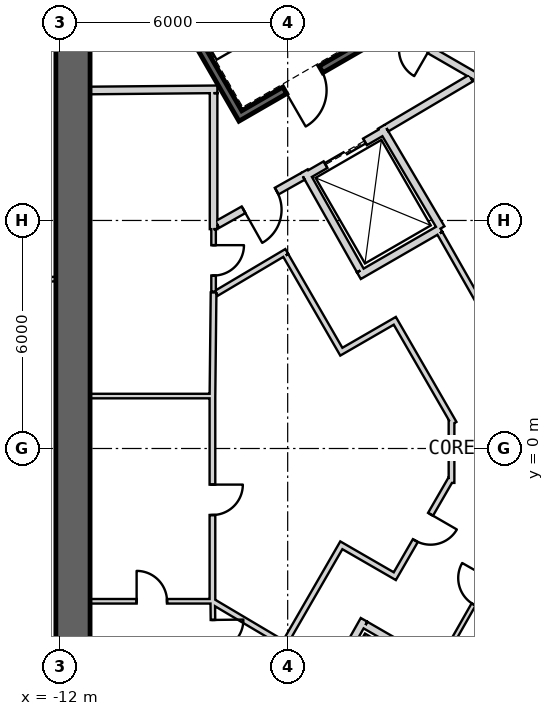
"""IFC4 building model, lengths in metres.
Left out: names, types, materials, properties, quantities, classifications, styles, units other than length and angle.
Written with IfcOpenShell. Run it as: python <this file> out.ifc"""

import sys

from ifc_helpers import new_model, si_unit, direction, frame, frame_2d, origin, place, context, subcontext, project, spatial, rectangle, extrude, element, fill, save


model = new_model("IFC4")
c1 = context("Model", 3, precision=1e-05, world=origin(), true_north=direction((0.0, 1.0)))
c2 = subcontext(c1, "Body", "Model", "MODEL_VIEW")
j1 = project(units=[si_unit("LENGTHUNIT", "METRE"), si_unit("PLANEANGLEUNIT", "RADIAN")], contexts=[c1])
p1 = place(None, origin())
s1 = spatial("IfcSite", under=j1, at=p1, CompositionType="ELEMENT")
p2 = place(p1, origin())
s2 = spatial("IfcBuilding", under=s1, at=p2, CompositionType="ELEMENT")
p3 = place(p2, frame((0.0, 0.0, 415.3)))
s3 = spatial("IfcBuildingStorey", under=s2, at=p3, CompositionType="ELEMENT", Elevation=415.3)
p4 = place(p3, frame((19.475, 2.208, 0.0), z_axis=(0.0, 0.0, 1.0), x_axis=(-0.866028369851, 0.499994862586, 0.0)))
e1 = element("IfcWall", 1, at=p4, inside=s3, PredefinedType="SHEAR", context=c2, shape_type="SweptSolid", body=[
    extrude(rectangle(XDim=31.523, YDim=0.9, at=frame_2d((15.762, 0.0))), origin(), (0.0, 0.0, 1.0), 5.0),
])
p5 = place(p4, frame((3.612, 0.0, 0.0)))
e2 = element("IfcOpeningElement", 2, at=p5, cuts=e1, PredefinedType="OPENING", context=c2, shape_type="SweptSolid", body=[
    extrude(rectangle(XDim=1.2, YDim=2.4, at=frame_2d((0.6, 1.2))), frame((0.0, 0.46, 0.0), z_axis=(0.0, -1.0, 0.0), x_axis=(1.0, 0.0, 0.0)), (0.0, 0.0, 1.0), 0.92),
])
p6 = place(p4, frame((26.712, 0.0, 0.0)))
e3 = element("IfcOpeningElement", 3, at=p6, cuts=e1, PredefinedType="OPENING", context=c2, shape_type="SweptSolid", body=[
    extrude(rectangle(XDim=1.2, YDim=2.4, at=frame_2d((0.6, 1.2))), frame((0.0, 0.46, 0.0), z_axis=(0.0, -1.0, 0.0), x_axis=(1.0, 0.0, 0.0)), (0.0, 0.0, 1.0), 0.92),
])
p7 = place(p3, frame((-11.65, 15.762, 0.0), z_axis=(0.0, 0.0, 1.0), x_axis=(0.0, -1.0, 0.0)))
e4 = element("IfcWall", 4, at=p7, inside=s3, PredefinedType="SHEAR", context=c2, shape_type="SweptSolid", body=[
    extrude(rectangle(XDim=31.523, YDim=0.9, at=frame_2d((15.762, 0.0))), origin(), (0.0, 0.0, 1.0), 5.0),
])
p8 = place(p7, frame((3.612, 0.0, 0.0)))
e5 = element("IfcOpeningElement", 5, at=p8, cuts=e4, PredefinedType="OPENING", context=c2, shape_type="SweptSolid", body=[
    extrude(rectangle(XDim=1.2, YDim=2.4, at=frame_2d((0.6, 1.2))), frame((0.0, 0.46, 0.0), z_axis=(0.0, -1.0, 0.0), x_axis=(1.0, 0.0, 0.0)), (0.0, 0.0, 1.0), 0.92),
])
p9 = place(p7, frame((26.712, 0.0, 0.0)))
e6 = element("IfcOpeningElement", 6, at=p9, cuts=e4, PredefinedType="OPENING", context=c2, shape_type="SweptSolid", body=[
    extrude(rectangle(XDim=1.2, YDim=2.4, at=frame_2d((0.6, 1.2))), frame((0.0, 0.46, 0.0), z_axis=(0.0, -1.0, 0.0), x_axis=(1.0, 0.0, 0.0)), (0.0, 0.0, 1.0), 0.92),
])
p10 = place(p3, frame((-7.825, -17.97, 0.0), z_axis=(0.0, 0.0, 1.0), x_axis=(0.866028369851, 0.499994862586, 0.0)))
e7 = element("IfcWall", 7, at=p10, inside=s3, PredefinedType="SHEAR", context=c2, shape_type="SweptSolid", body=[
    extrude(rectangle(XDim=31.523, YDim=0.9, at=frame_2d((15.762, 0.0))), origin(), (0.0, 0.0, 1.0), 5.0),
])
p11 = place(p10, frame((17.862, 0.0, 0.0)))
e8 = element("IfcOpeningElement", 8, at=p11, cuts=e7, PredefinedType="OPENING", context=c2, shape_type="SweptSolid", body=[
    extrude(rectangle(XDim=1.2, YDim=2.4, at=frame_2d((0.6, 1.2))), frame((0.0, 0.46, 0.0), z_axis=(0.0, -1.0, 0.0), x_axis=(1.0, 0.0, 0.0)), (0.0, 0.0, 1.0), 0.92),
])
p12 = place(p10, frame((20.562, 0.0, 0.0)))
e9 = element("IfcOpeningElement", 9, at=p12, cuts=e7, PredefinedType="OPENING", context=c2, shape_type="SweptSolid", body=[
    extrude(rectangle(XDim=1.2, YDim=2.4, at=frame_2d((0.6, 1.2))), frame((0.0, 0.46, 0.0), z_axis=(0.0, -1.0, 0.0), x_axis=(1.0, 0.0, 0.0)), (0.0, 0.0, 1.0), 0.92),
])
p13 = place(p10, frame((26.712, 0.0, 0.0)))
e10 = element("IfcOpeningElement", 10, at=p13, cuts=e7, PredefinedType="OPENING", context=c2, shape_type="SweptSolid", body=[
    extrude(rectangle(XDim=1.2, YDim=2.4, at=frame_2d((0.6, 1.2))), frame((0.0, 0.46, 0.0), z_axis=(0.0, -1.0, 0.0), x_axis=(1.0, 0.0, 0.0)), (0.0, 0.0, 1.0), 0.92),
])
p14 = place(p10, frame((3.612, 0.0, 0.0)))
e11 = element("IfcOpeningElement", 11, at=p14, cuts=e7, PredefinedType="OPENING", context=c2, shape_type="SweptSolid", body=[
    extrude(rectangle(XDim=1.2, YDim=2.4, at=frame_2d((0.6, 1.2))), frame((0.0, 0.46, 0.0), z_axis=(0.0, -1.0, 0.0), x_axis=(1.0, 0.0, 0.0)), (0.0, 0.0, 1.0), 0.92),
])
p15 = place(p3, frame((-2.146, 21.113, 0.04), z_axis=(0.0, 0.0, 1.0), x_axis=(0.902316759071, -0.43107362051, 0.0)))
e12 = element("IfcWall", 12, at=p15, inside=s3, PredefinedType="PARAPET", context=c2, shape_type="SweptSolid", body=[
    extrude(rectangle(XDim=24.864, YDim=0.5, at=frame_2d((12.432, 0.0))), origin(), (0.0, 0.0, 1.0), 0.6),
])
p16 = place(p3, frame((-11.245, 15.678, -0.25), z_axis=(0.0, 0.0, 1.0), x_axis=(0.499977274689, -0.866038523851, 0.0)))
e13 = element("IfcWall", 13, at=p16, inside=s3, PredefinedType="SHEAR", context=c2, shape_type="SweptSolid", body=[
    extrude(rectangle(XDim=8.1, YDim=0.2, at=frame_2d((4.05, 0.0))), origin(), (0.0, 0.0, 1.0), 5.0),
])
p17 = place(p3, frame((-7.159, 8.8, -0.25), z_axis=(0.0, 0.0, 1.0), x_axis=(0.866047807691, 0.499961193289, 0.0)))
e14 = element("IfcWall", 14, at=p17, inside=s3, PredefinedType="SHEAR", context=c2, shape_type="SweptSolid", body=[
    extrude(rectangle(XDim=3.6, YDim=0.2, at=frame_2d((1.8, 0.0))), origin(), (0.0, 0.0, 1.0), 5.0),
])
p18 = place(p17, frame((1.25, 0.0, 0.25)))
e15 = element("IfcOpeningElement", 15, at=p18, cuts=e14, PredefinedType="OPENING", context=c2, shape_type="SweptSolid", body=[
    extrude(rectangle(XDim=1.1, YDim=2.1, at=frame_2d((0.55, 1.05))), frame((0.0, 0.11, 0.0), z_axis=(0.0, -1.0, 0.0), x_axis=(1.0, 0.0, 0.0)), (0.0, 0.0, 1.0), 0.22),
])
p19 = place(p3, frame((-5.524, 7.168, 0.0), z_axis=(0.0, 0.0, 1.0), x_axis=(0.866024647952, 0.500001309137, 0.0)))
e16 = element("IfcWall", 16, at=p19, inside=s3, PredefinedType="PLUMBINGWALL", context=c2, shape_type="SweptSolid", body=[
    extrude(rectangle(XDim=2.4, YDim=0.2, at=frame_2d((1.2, 0.0))), origin(), (0.0, 0.0, 1.0), 4.75),
])
p20 = place(p19, frame((0.6, 0.0, 0.0)))
e17 = element("IfcOpeningElement", 17, at=p20, cuts=e16, PredefinedType="OPENING", context=c2, shape_type="SweptSolid", body=[
    extrude(rectangle(XDim=1.2, YDim=2.4, at=frame_2d((0.6, 1.2))), frame((0.0, 0.11, 0.0), z_axis=(0.0, -1.0, 0.0), x_axis=(1.0, 0.0, 0.0)), (0.0, 0.0, 1.0), 0.22),
])
p21 = place(p3, frame((-3.538, 8.465, 0.0), z_axis=(0.0, 0.0, 1.0), x_axis=(0.508647062354, -0.860975125052, 0.0)))
e18 = element("IfcWall", 18, at=p21, inside=s3, PredefinedType="PLUMBINGWALL", context=c2, shape_type="SweptSolid", body=[
    extrude(rectangle(XDim=3.1, YDim=0.2, at=frame_2d((1.55, 0.0))), origin(), (0.0, 0.0, 1.0), 4.75),
])
p22 = place(p3, frame((-1.979, 5.786, 0.0), z_axis=(0.0, 0.0, 1.0), x_axis=(-0.866016689309, -0.500015093611, 0.0)))
e19 = element("IfcWall", 19, at=p22, inside=s3, PredefinedType="PLUMBINGWALL", context=c2, shape_type="SweptSolid", body=[
    extrude(rectangle(XDim=2.479, YDim=0.2, at=frame_2d((1.24, 0.0))), origin(), (0.0, 0.0, 1.0), 4.75),
])
p23 = place(p3, frame((-5.562, 7.296, 0.0), z_axis=(0.0, 0.0, 1.0), x_axis=(0.49134651263, -0.870964180966, 0.0)))
e20 = element("IfcWall", 20, at=p23, inside=s3, PredefinedType="PLUMBINGWALL", context=c2, shape_type="SweptSolid", body=[
    extrude(rectangle(XDim=3.0, YDim=0.2, at=frame_2d((1.5, 0.0))), origin(), (0.0, 0.0, 1.0), 4.75),
])
p24 = place(p3, frame((-3.99, -4.509, 0.0), z_axis=(0.0, 0.0, 1.0), x_axis=(-0.491358283181, -0.870957540612, 0.0)))
e21 = element("IfcWall", 21, at=p24, inside=s3, PredefinedType="PLUMBINGWALL", context=c2, shape_type="SweptSolid", body=[
    extrude(rectangle(XDim=3.2, YDim=0.2, at=frame_2d((1.6, 0.0))), origin(), (0.0, 0.0, 1.0), 4.75),
])
p25 = place(p3, frame((-3.953, -4.646, 0.0), z_axis=(0.0, 0.0, 1.0), x_axis=(0.866065302921, -0.4999308863, 0.0)))
e22 = element("IfcWall", 22, at=p25, inside=s3, PredefinedType="PLUMBINGWALL", context=c2, shape_type="SweptSolid", body=[
    extrude(rectangle(XDim=2.264, YDim=0.2, at=frame_2d((1.132, 0.0))), origin(), (0.0, 0.0, 1.0), 4.75),
])
p26 = place(p3, frame((-11.2, 1.38, 0.0), z_axis=(0.0, 0.0, 1.0), x_axis=(1.0, 0.0, 0.0)))
e23 = element("IfcWall", 23, at=p26, inside=s3, PredefinedType="PARTITIONING", context=c2, shape_type="SweptSolid", body=[
    extrude(rectangle(XDim=3.25, YDim=0.12, at=frame_2d((1.625, 0.0))), origin(), (0.0, 0.0, 1.0), 4.75),
])
p27 = place(p3, frame((-7.85, 9.451, 0.0), z_axis=(0.0, 0.0, 1.0), x_axis=(-0.999957167047, -0.009255488683, 0.0)))
e24 = element("IfcWall", 24, at=p27, inside=s3, PredefinedType="PARTITIONING", context=c2, shape_type="SweptSolid", body=[
    extrude(rectangle(XDim=3.35, YDim=0.2, at=frame_2d((1.675, 0.0))), origin(), (0.0, 0.0, 1.0), 4.75),
])
p28 = place(p3, frame((-7.95, 5.772, 0.0), z_axis=(0.0, 0.0, 1.0), x_axis=(0.0, 1.0, 0.0)))
e25 = element("IfcWall", 25, at=p28, inside=s3, PredefinedType="PARTITIONING", context=c2, shape_type="SweptSolid", body=[
    extrude(rectangle(XDim=3.578, YDim=0.2, at=frame_2d((1.789, 0.0))), origin(), (0.0, 0.0, 1.0), 4.75),
])
p29 = place(p3, frame((-7.95, 4.105, 0.0), z_axis=(0.0, 0.0, 1.0), x_axis=(-0.010899742406, -0.999940596043, 0.0)))
e26 = element("IfcWall", 26, at=p29, inside=s3, PredefinedType="PLUMBINGWALL", context=c2, shape_type="SweptSolid", body=[
    extrude(rectangle(XDim=2.755, YDim=0.15, at=frame_2d((1.377, 0.0))), origin(), (0.0, 0.0, 1.0), 4.75),
])
p30 = place(p3, frame((-7.95, 4.128, 0.0), z_axis=(0.0, 0.0, 1.0), x_axis=(0.0, 1.0, 0.0)))
e27 = element("IfcWall", 27, at=p30, inside=s3, PredefinedType="PARTITIONING", context=c2, shape_type="SweptSolid", body=[
    extrude(rectangle(XDim=1.644, YDim=0.12, at=frame_2d((0.822, 0.0))), origin(), (0.0, 0.0, 1.0), 4.75),
])
p31 = place(p30, frame((0.422, 0.0, 0.0)))
e28 = element("IfcOpeningElement", 28, at=p31, cuts=e27, PredefinedType="OPENING", context=c2, shape_type="SweptSolid", body=[
    extrude(rectangle(XDim=0.8, YDim=2.1, at=frame_2d((0.4, 1.05))), frame((0.0, 0.07, 0.0), z_axis=(0.0, -1.0, 0.0), x_axis=(1.0, 0.0, 0.0)), (0.0, 0.0, 1.0), 0.14),
])
p32 = place(p3, frame((-11.2, -4.02, 0.0), z_axis=(0.0, 0.0, 1.0), x_axis=(1.0, 0.0, 0.0)))
e29 = element("IfcWall", 29, at=p32, inside=s3, PredefinedType="PARTITIONING", context=c2, shape_type="SweptSolid", body=[
    extrude(rectangle(XDim=3.25, YDim=0.12, at=frame_2d((1.625, 0.0))), origin(), (0.0, 0.0, 1.0), 4.75),
])
p33 = place(p32, frame((1.225, 0.0, 0.0)))
e30 = element("IfcOpeningElement", 30, at=p33, cuts=e29, PredefinedType="OPENING", context=c2, shape_type="SweptSolid", body=[
    extrude(rectangle(XDim=0.8, YDim=2.1, at=frame_2d((0.4, 1.05))), frame((0.0, 0.07, 0.0), z_axis=(0.0, -1.0, 0.0), x_axis=(1.0, 0.0, 0.0)), (0.0, 0.0, 1.0), 0.14),
])
p34 = place(p3, frame((-7.98, 1.35, 0.0), z_axis=(0.0, 0.0, 1.0), x_axis=(0.0, -1.0, 0.0)))
e31 = element("IfcWall", 31, at=p34, inside=s3, PredefinedType="PLUMBINGWALL", context=c2, shape_type="SweptSolid", body=[
    extrude(rectangle(XDim=5.4, YDim=0.15, at=frame_2d((2.7, 0.0))), origin(), (0.0, 0.0, 1.0), 4.75),
])
p35 = place(p34, frame((2.3, 0.0, 0.0)))
e32 = element("IfcOpeningElement", 32, at=p35, cuts=e31, PredefinedType="OPENING", context=c2, shape_type="SweptSolid", body=[
    extrude(rectangle(XDim=0.8, YDim=2.1, at=frame_2d((0.4, 1.05))), frame((0.0, 0.085, 0.0), z_axis=(0.0, -1.0, 0.0), x_axis=(1.0, 0.0, 0.0)), (0.0, 0.0, 1.0), 0.17),
])
p36 = place(p3, frame((-7.951, -5.772, 0.0), z_axis=(0.0, 0.0, 1.0), x_axis=(-0.012047318415, 0.999927428426, 0.0)))
e33 = element("IfcWall", 33, at=p36, inside=s3, PredefinedType="PARTITIONING", context=c2, shape_type="SweptSolid", body=[
    extrude(rectangle(XDim=1.723, YDim=0.12, at=frame_2d((0.861, 0.0))), origin(), (0.0, 0.0, 1.0), 4.75),
])
p37 = place(p36, frame((0.461, 0.0, 0.0)))
e34 = element("IfcOpeningElement", 34, at=p37, cuts=e33, PredefinedType="OPENING", context=c2, shape_type="SweptSolid", body=[
    extrude(rectangle(XDim=0.8, YDim=2.1, at=frame_2d((0.4, 1.05))), frame((0.0, 0.07, 0.0), z_axis=(0.0, -1.0, 0.0), x_axis=(1.0, 0.0, 0.0)), (0.0, 0.0, 1.0), 0.14),
])
p38 = place(p3, frame((-4.296, 11.66, 0.0), z_axis=(0.0, 0.0, 1.0), x_axis=(0.866027389382, -0.499996560828, 0.0)))
e35 = element("IfcWall", 35, at=p38, inside=s3, PredefinedType="PARTITIONING", context=c2, shape_type="SweptSolid", body=[
    extrude(rectangle(XDim=3.778, YDim=0.2, at=frame_2d((1.889, 0.0))), origin(), (0.0, 0.0, 1.0), 4.75),
])
p39 = place(p38, frame((1.539, 0.0, 0.0)))
e36 = element("IfcOpeningElement", 36, at=p39, cuts=e35, PredefinedType="OPENING", context=c2, shape_type="SweptSolid", body=[
    extrude(rectangle(XDim=0.8, YDim=2.1, at=frame_2d((0.4, 1.05))), frame((0.0, 0.11, 0.0), z_axis=(0.0, -1.0, 0.0), x_axis=(1.0, 0.0, 0.0)), (0.0, 0.0, 1.0), 0.22),
])
p40 = place(p3, frame((-1.179, 9.745, 0.0), z_axis=(0.0, 0.0, 1.0), x_axis=(-0.860630814782, -0.509229418482, 0.0)))
e37 = element("IfcWall", 37, at=p40, inside=s3, PredefinedType="PARTITIONING", context=c2, shape_type="SweptSolid", body=[
    extrude(rectangle(XDim=2.582, YDim=0.2, at=frame_2d((1.291, 0.0))), origin(), (0.0, 0.0, 1.0), 4.75),
])
p41 = place(p3, frame((-5.6, 7.16, 0.0), z_axis=(0.0, 0.0, 1.0), x_axis=(-0.871350695252, -0.490660744185, 0.0)))
e38 = element("IfcWall", 38, at=p41, inside=s3, PredefinedType="PARTITIONING", context=c2, shape_type="SweptSolid", body=[
    extrude(rectangle(XDim=2.582, YDim=0.2, at=frame_2d((1.291, 0.0))), origin(), (0.0, 0.0, 1.0), 4.75),
])
p42 = place(p41, frame((0.791, 0.0, 0.0)))
e39 = element("IfcOpeningElement", 39, at=p42, cuts=e38, PredefinedType="OPENING", context=c2, shape_type="SweptSolid", body=[
    extrude(rectangle(XDim=1.0, YDim=2.1, at=frame_2d((0.5, 1.05))), frame((0.0, 0.11, 0.0), z_axis=(0.0, -1.0, 0.0), x_axis=(1.0, 0.0, 0.0)), (0.0, 0.0, 1.0), 0.22),
])
p43 = place(p3, frame((-1.994, 5.661, 0.0), z_axis=(0.0, 0.0, 1.0), x_axis=(0.494341211302, -0.869267948798, 0.0)))
e40 = element("IfcWall", 40, at=p43, inside=s3, PredefinedType="PLUMBINGWALL", context=c2, shape_type="SweptSolid", body=[
    extrude(rectangle(XDim=4.361, YDim=0.15, at=frame_2d((2.18, 0.0))), origin(), (0.0, 0.0, 1.0), 4.75),
])
p44 = place(p3, frame((0.224, -1.761, 0.0), z_axis=(0.0, 0.0, 1.0), x_axis=(-0.494327216836, -0.869275907118, 0.0)))
e41 = element("IfcWall", 41, at=p44, inside=s3, PredefinedType="PARTITIONING", context=c2, shape_type="SweptSolid", body=[
    extrude(rectangle(XDim=4.487, YDim=0.12, at=frame_2d((2.244, 0.0))), origin(), (0.0, 0.0, 1.0), 4.75),
])
p45 = place(p44, frame((1.895, 0.0, 0.0)))
e42 = element("IfcOpeningElement", 42, at=p45, cuts=e41, PredefinedType="OPENING", context=c2, shape_type="SweptSolid", body=[
    extrude(rectangle(XDim=0.8, YDim=2.1, at=frame_2d((0.4, 1.05))), frame((0.0, 0.07, 0.0), z_axis=(0.0, -1.0, 0.0), x_axis=(1.0, 0.0, 0.0)), (0.0, 0.0, 1.0), 0.14),
])
p46 = place(p3, frame((-6.024, 5.183, 0.0), z_axis=(0.0, 0.0, 1.0), x_axis=(-0.860114558627, -0.510100917503, 0.0)))
e43 = element("IfcWall", 43, at=p46, inside=s3, PredefinedType="PLUMBINGWALL", context=c2, shape_type="SweptSolid", body=[
    extrude(rectangle(XDim=2.152, YDim=0.15, at=frame_2d((1.076, 0.0))), origin(), (0.0, 0.0, 1.0), 4.75),
])
p47 = place(p3, frame((-4.551, 2.482, 0.0), z_axis=(0.0, 0.0, 1.0), x_axis=(-0.499990139034, 0.866031096941, 0.0)))
e44 = element("IfcWall", 44, at=p47, inside=s3, PredefinedType="PLUMBINGWALL", context=c2, shape_type="SweptSolid", body=[
    extrude(rectangle(XDim=3.0, YDim=0.15, at=frame_2d((1.5, 0.0))), origin(), (0.0, 0.0, 1.0), 4.75),
])
p48 = place(p3, frame((-3.116, 3.397, 0.0), z_axis=(0.0, 0.0, 1.0), x_axis=(-0.866053003207, -0.499952193351, 0.0)))
e45 = element("IfcWall", 45, at=p48, inside=s3, PredefinedType="PLUMBINGWALL", context=c2, shape_type="SweptSolid", body=[
    extrude(rectangle(XDim=1.625, YDim=0.15, at=frame_2d((0.812, 0.0))), origin(), (0.0, 0.0, 1.0), 4.75),
])
p49 = place(p3, frame((-1.624, 0.663, 0.0), z_axis=(0.0, 0.0, 1.0), x_axis=(-0.500035348339, 0.866004994449, 0.0)))
e46 = element("IfcWall", 46, at=p49, inside=s3, PredefinedType="PLUMBINGWALL", context=c2, shape_type="SweptSolid", body=[
    extrude(rectangle(XDim=3.039, YDim=0.15, at=frame_2d((1.52, 0.0))), origin(), (0.0, 0.0, 1.0), 4.75),
])
p50 = place(p3, frame((-1.689, -0.905, 0.0), z_axis=(0.0, 0.0, 1.0), x_axis=(0.0, 1.0, 0.0)))
e47 = element("IfcWall", 47, at=p50, inside=s3, PredefinedType="PLUMBINGWALL", context=c2, shape_type="SweptSolid", body=[
    extrude(rectangle(XDim=1.656, YDim=0.15, at=frame_2d((0.828, 0.0))), origin(), (0.0, 0.0, 1.0), 4.75),
])
p51 = place(p3, frame((-3.219, -3.425, 0.0), z_axis=(0.0, 0.0, 1.0), x_axis=(0.499996236806, 0.866027576455, 0.0)))
e48 = element("IfcWall", 48, at=p51, inside=s3, PredefinedType="PLUMBINGWALL", context=c2, shape_type="SweptSolid", body=[
    extrude(rectangle(XDim=3.036, YDim=0.15, at=frame_2d((1.518, 0.0))), origin(), (0.0, 0.0, 1.0), 4.75),
])
p52 = place(p51, frame((1.156, 0.0, 0.0)))
e49 = element("IfcOpeningElement", 49, at=p52, cuts=e48, PredefinedType="OPENING", context=c2, shape_type="SweptSolid", body=[
    extrude(rectangle(XDim=0.8, YDim=2.1, at=frame_2d((0.4, 1.05))), frame((0.0, 0.085, 0.0), z_axis=(0.0, -1.0, 0.0), x_axis=(1.0, 0.0, 0.0)), (0.0, 0.0, 1.0), 0.17),
])
p53 = place(p3, frame((-4.653, -2.51, 0.0), z_axis=(0.0, 0.0, 1.0), x_axis=(0.866053003207, -0.499952193351, 0.0)))
e50 = element("IfcWall", 50, at=p53, inside=s3, PredefinedType="PLUMBINGWALL", context=c2, shape_type="SweptSolid", body=[
    extrude(rectangle(XDim=1.625, YDim=0.15, at=frame_2d((0.812, 0.0))), origin(), (0.0, 0.0, 1.0), 4.75),
])
p54 = place(p3, frame((-6.126, -5.21, 0.0), z_axis=(0.0, 0.0, 1.0), x_axis=(0.499990139034, 0.866031096941, 0.0)))
e51 = element("IfcWall", 51, at=p54, inside=s3, PredefinedType="PLUMBINGWALL", context=c2, shape_type="SweptSolid", body=[
    extrude(rectangle(XDim=3.0, YDim=0.15, at=frame_2d((1.5, 0.0))), origin(), (0.0, 0.0, 1.0), 4.75),
])
p55 = place(p3, frame((-7.95, -4.041, 0.0), z_axis=(0.0, 0.0, 1.0), x_axis=(0.860090281069, -0.510141851263, 0.0)))
e52 = element("IfcWall", 52, at=p55, inside=s3, PredefinedType="PLUMBINGWALL", context=c2, shape_type="SweptSolid", body=[
    extrude(rectangle(XDim=2.089, YDim=0.15, at=frame_2d((1.045, 0.0))), origin(), (0.0, 0.0, 1.0), 4.75),
])
p56 = place(p3, frame((-12.1, 4.462, 0.0), z_axis=(0.0, 0.0, 1.0), x_axis=(-0.996967215132, -0.077822695606, 0.0)))
e53 = element("IfcWall", 53, at=p56, inside=s3, PredefinedType="PARTITIONING", context=c2, shape_type="SweptSolid", body=[
    extrude(rectangle(XDim=5.719, YDim=0.12, at=frame_2d((2.859, 0.0))), origin(), (0.0, 0.0, 1.0), 4.75),
])
p57 = place(p56, frame((1.0, 0.0, 0.0)))
e54 = element("IfcOpeningElement", 54, at=p57, cuts=e53, PredefinedType="OPENING", context=c2, shape_type="SweptSolid", body=[
    extrude(rectangle(XDim=0.9, YDim=2.1, at=frame_2d((0.45, 1.05))), frame((0.0, 0.07, 0.0), z_axis=(0.0, -1.0, 0.0), x_axis=(1.0, 0.0, 0.0)), (0.0, 0.0, 1.0), 0.14),
])
p58 = place(p56, frame((3.918, 0.0, 0.0)))
e55 = element("IfcOpeningElement", 55, at=p58, cuts=e53, PredefinedType="OPENING", context=c2, shape_type="SweptSolid", body=[
    extrude(rectangle(XDim=0.9, YDim=2.1, at=frame_2d((0.45, 1.05))), frame((0.0, 0.07, 0.0), z_axis=(0.0, -1.0, 0.0), x_axis=(1.0, 0.0, 0.0)), (0.0, 0.0, 1.0), 0.14),
])
p59 = place(p18, origin())
e56 = element("IfcDoor", 56, at=p59, inside=s3, OperationType="SINGLE_SWING_LEFT", PredefinedType="USERDEFINED", context=c2, shape_type="SweptSolid", body=[
    extrude(rectangle(XDim=1.1, YDim=2.1, at=frame_2d((0.55, 1.05))), frame((0.0, 0.025, 0.0), z_axis=(0.0, -1.0, 0.0), x_axis=(1.0, 0.0, 0.0)), (0.0, 0.0, 1.0), 0.05),
])
fill(e15, e56)
p60 = place(p42, origin())
e57 = element("IfcDoor", 57, at=p60, inside=s3, OperationType="SINGLE_SWING_RIGHT", PredefinedType="USERDEFINED", context=c2, shape_type="SweptSolid", body=[
    extrude(rectangle(XDim=1.0, YDim=2.1, at=frame_2d((0.5, 1.05))), frame((0.0, 0.025, 0.0), z_axis=(0.0, -1.0, 0.0), x_axis=(1.0, 0.0, 0.0)), (0.0, 0.0, 1.0), 0.05),
])
fill(e39, e57)
p61 = place(p20, origin())
e58 = element("IfcDoor", 58, at=p61, inside=s3, OperationType="SLIDING_TO_LEFT", PredefinedType="USERDEFINED", context=c2, shape_type="SweptSolid", body=[
    extrude(rectangle(XDim=1.2, YDim=2.4, at=frame_2d((0.6, 1.2))), frame((0.0, 0.025, 0.0), z_axis=(0.0, -1.0, 0.0), x_axis=(1.0, 0.0, 0.0)), (0.0, 0.0, 1.0), 0.05),
])
fill(e17, e58)
p62 = place(p45, origin())
e59 = element("IfcDoor", 59, at=p62, inside=s3, OperationType="SINGLE_SWING_LEFT", PredefinedType="USERDEFINED", context=c2, shape_type="SweptSolid", body=[
    extrude(rectangle(XDim=0.8, YDim=2.1, at=frame_2d((0.4, 1.05))), frame((0.0, 0.025, 0.0), z_axis=(0.0, -1.0, 0.0), x_axis=(1.0, 0.0, 0.0)), (0.0, 0.0, 1.0), 0.05),
])
fill(e42, e59)
p63 = place(p52, origin())
e60 = element("IfcDoor", 60, at=p63, inside=s3, OperationType="SINGLE_SWING_RIGHT", PredefinedType="USERDEFINED", context=c2, shape_type="SweptSolid", body=[
    extrude(rectangle(XDim=0.8, YDim=2.1, at=frame_2d((0.4, 1.05))), frame((0.0, 0.025, 0.0), z_axis=(0.0, -1.0, 0.0), x_axis=(1.0, 0.0, 0.0)), (0.0, 0.0, 1.0), 0.05),
])
fill(e49, e60)
p64 = place(p31, origin())
e61 = element("IfcDoor", 61, at=p64, inside=s3, OperationType="SINGLE_SWING_RIGHT", PredefinedType="USERDEFINED", context=c2, shape_type="SweptSolid", body=[
    extrude(rectangle(XDim=0.8, YDim=2.1, at=frame_2d((0.4, 1.05))), frame((0.0, 0.025, 0.0), z_axis=(0.0, -1.0, 0.0), x_axis=(1.0, 0.0, 0.0)), (0.0, 0.0, 1.0), 0.05),
])
fill(e28, e61)
p65 = place(p33, origin())
e62 = element("IfcDoor", 62, at=p65, inside=s3, OperationType="SINGLE_SWING_LEFT", PredefinedType="USERDEFINED", context=c2, shape_type="SweptSolid", body=[
    extrude(rectangle(XDim=0.8, YDim=2.1, at=frame_2d((0.4, 1.05))), frame((0.0, 0.025, 0.0), z_axis=(0.0, -1.0, 0.0), x_axis=(1.0, 0.0, 0.0)), (0.0, 0.0, 1.0), 0.05),
])
fill(e30, e62)
p66 = place(p37, origin())
e63 = element("IfcDoor", 63, at=p66, inside=s3, OperationType="SINGLE_SWING_RIGHT", PredefinedType="USERDEFINED", context=c2, shape_type="SweptSolid", body=[
    extrude(rectangle(XDim=0.8, YDim=2.1, at=frame_2d((0.4, 1.05))), frame((0.0, 0.025, 0.0), z_axis=(0.0, -1.0, 0.0), x_axis=(1.0, 0.0, 0.0)), (0.0, 0.0, 1.0), 0.05),
])
fill(e34, e63)
p67 = place(p35, origin())
e64 = element("IfcDoor", 64, at=p67, inside=s3, OperationType="SINGLE_SWING_LEFT", PredefinedType="USERDEFINED", context=c2, shape_type="SweptSolid", body=[
    extrude(rectangle(XDim=0.8, YDim=2.1, at=frame_2d((0.4, 1.05))), frame((0.0, 0.025, 0.0), z_axis=(0.0, -1.0, 0.0), x_axis=(1.0, 0.0, 0.0)), (0.0, 0.0, 1.0), 0.05),
])
fill(e32, e64)
save(model, sys.argv[1])
